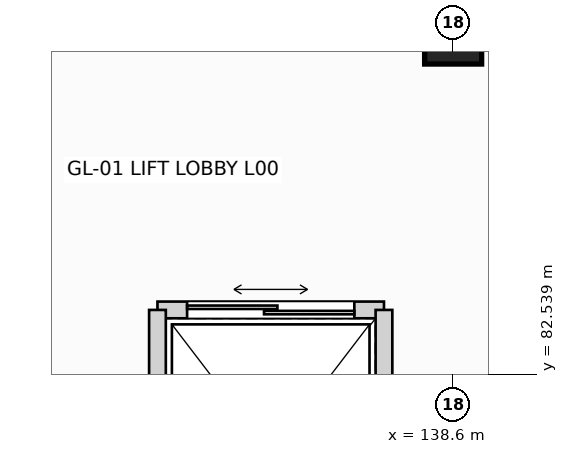
"""IFC4 building model, lengths in metres.
Left out: names, types, materials, properties, quantities, classifications, styles, units other than length and angle.
Written with IfcOpenShell. Run it as: python <this file> out.ifc"""

import sys

from ifc_helpers import new_model, si_unit, direction, frame, frame_2d, origin, origin_2d, place, context, subcontext, project, spatial, rectangle, extrude, element, fill, save


model = new_model("IFC4")
c1 = context("Model", 3, precision=1e-05, world=origin(), true_north=direction((0.0, 1.0)))
c2 = subcontext(c1, "Body", "Model", "MODEL_VIEW")
j1 = project(units=[si_unit("LENGTHUNIT", "METRE"), si_unit("PLANEANGLEUNIT", "RADIAN")], contexts=[c1])
p1 = place(None, origin())
s1 = spatial("IfcSite", under=j1, at=p1, CompositionType="ELEMENT")
p2 = place(p1, origin())
s2 = spatial("IfcBuilding", under=s1, at=p2, CompositionType="ELEMENT")
p3 = place(p2, origin())
s3 = spatial("IfcBuildingStorey", under=s2, at=p3, CompositionType="ELEMENT", Elevation=0.0)
p4 = place(p3, frame((138.6, 87.0, 0.0), z_axis=(0.0, 0.0, 1.0), x_axis=(1.0, 0.0, 0.0)))
e1 = element("IfcColumn", 1, at=p4, inside=s3, PredefinedType="COLUMN", context=c2, shape_type="SweptSolid", body=[
    extrude(rectangle(XDim=0.75, YDim=0.75, at=origin_2d()), origin(), (0.0, 0.0, 1.0), 6.0),
])
p5 = place(p3, frame((134.71, 83.39, 0.0), z_axis=(0.0, 0.0, 1.0), x_axis=(1.0, 0.0, 0.0)))
e2 = element("IfcWall", 2, at=p5, inside=s3, PredefinedType="PARTITIONING", context=c2, shape_type="SweptSolid", body=[
    extrude(rectangle(XDim=2.98, YDim=0.22, at=frame_2d((1.49, 0.0))), origin(), (0.0, 0.0, 1.0), 5.665),
])
p6 = place(p5, frame((0.39, 0.0, 0.0)))
e3 = element("IfcOpeningElement", 3, at=p6, cuts=e2, PredefinedType="OPENING", context=c2, shape_type="SweptSolid", body=[
    extrude(rectangle(XDim=2.2, YDim=2.5, at=frame_2d((1.1, 1.25))), frame((0.0, 0.12, 0.0), z_axis=(0.0, -1.0, 0.0), x_axis=(1.0, 0.0, 0.0)), (0.0, 0.0, 1.0), 0.24),
])
for number, where, z_axis, x_axis in (
    (4, (134.71, 79.61, 0.0), (0.0, 0.0, 1.0), (0.0, 1.0, 0.0)),
    (5, (137.69, 79.61, 0.0), (0.0, 0.0, 1.0), (0.0, 1.0, 0.0)),
):
    element("IfcWall", number, at=place(p3, frame(where, z_axis=z_axis, x_axis=x_axis)), inside=s3, PredefinedType="PARTITIONING", context=c2, shape_type="SweptSolid", body=[
        extrude(rectangle(XDim=3.78, YDim=0.22, at=frame_2d((1.89, 0.0))), origin(), (0.0, 0.0, 1.0), 5.665),
    ])
p7 = place(p6, origin())
e6 = element("IfcDoor", 6, at=p7, inside=s3, OperationType="DOUBLE_DOOR_SLIDING", PredefinedType="DOOR", context=c2, shape_type="SweptSolid", body=[
    extrude(rectangle(XDim=2.2, YDim=2.5, at=frame_2d((1.1, 1.25))), frame((0.0, 0.025, 0.0), z_axis=(0.0, -1.0, 0.0), x_axis=(1.0, 0.0, 0.0)), (0.0, 0.0, 1.0), 0.05),
])
fill(e3, e6)
save(model, sys.argv[1])
